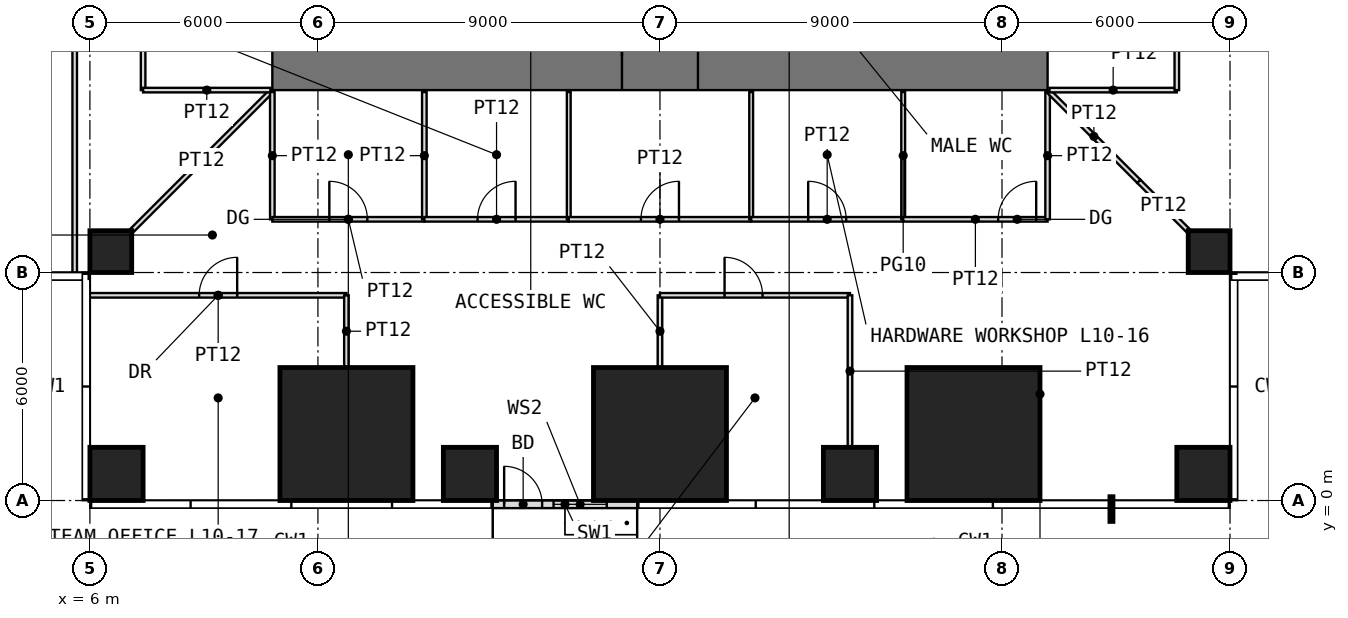
"""IFC4 building model, lengths in metres.
Left out: names, types, materials, properties, quantities, classifications, styles, units other than length and angle.
Written with IfcOpenShell. Run it as: python <this file> out.ifc"""

import sys

from ifc_helpers import new_model, si_unit, direction, frame, frame_2d, origin, origin_2d, place, context, subcontext, project, spatial, rectangle, extrude, element, fill, save


model = new_model("IFC4")
c1 = context("Model", 3, precision=1e-05, world=origin(), true_north=direction((0.0, 1.0)))
c2 = subcontext(c1, "Body", "Model", "MODEL_VIEW")
j1 = project(units=[si_unit("LENGTHUNIT", "METRE"), si_unit("PLANEANGLEUNIT", "RADIAN")], contexts=[c1])
p1 = place(None, origin())
s1 = spatial("IfcSite", under=j1, at=p1, CompositionType="ELEMENT")
p2 = place(p1, origin())
s2 = spatial("IfcBuilding", under=s1, at=p2, CompositionType="ELEMENT")
p3 = place(p2, frame((0.0, 0.0, 46.5)))
s3 = spatial("IfcBuildingStorey", under=s2, at=p3, CompositionType="ELEMENT", Elevation=46.5)
p4 = place(p3, frame((6.7, 0.7, 0.0), z_axis=(0.0, 0.0, 1.0), x_axis=(1.0, 0.0, 0.0)))
e1 = element("IfcColumn", 1, at=p4, inside=s3, PredefinedType="COLUMN", context=c2, shape_type="SweptSolid", body=[
    extrude(rectangle(XDim=1.4, YDim=1.4, at=origin_2d()), origin(), (0.0, 0.0, 1.0), 4.0),
])
p5 = place(p3, frame((12.75, 1.75, 0.0), z_axis=(0.0, 0.0, 1.0), x_axis=(1.0, 0.0, 0.0)))
e2 = element("IfcColumn", 2, at=p5, inside=s3, PredefinedType="COLUMN", context=c2, shape_type="SweptSolid", body=[
    extrude(rectangle(XDim=3.5, YDim=3.5, at=origin_2d()), origin(), (0.0, 0.0, 1.0), 4.0),
])
p6 = place(p3, frame((16.0, 0.7, 0.0), z_axis=(0.0, 0.0, 1.0), x_axis=(1.0, 0.0, 0.0)))
e3 = element("IfcColumn", 3, at=p6, inside=s3, PredefinedType="COLUMN", context=c2, shape_type="SweptSolid", body=[
    extrude(rectangle(XDim=1.4, YDim=1.4, at=origin_2d()), origin(), (0.0, 0.0, 1.0), 4.0),
])
p7 = place(p3, frame((21.0, 1.75, 0.0), z_axis=(0.0, 0.0, 1.0), x_axis=(1.0, 0.0, 0.0)))
e4 = element("IfcColumn", 4, at=p7, inside=s3, PredefinedType="COLUMN", context=c2, shape_type="SweptSolid", body=[
    extrude(rectangle(XDim=3.5, YDim=3.5, at=origin_2d()), origin(), (0.0, 0.0, 1.0), 4.0),
])
p8 = place(p3, frame((26.0, 0.7, 0.0), z_axis=(0.0, 0.0, 1.0), x_axis=(1.0, 0.0, 0.0)))
e5 = element("IfcColumn", 5, at=p8, inside=s3, PredefinedType="COLUMN", context=c2, shape_type="SweptSolid", body=[
    extrude(rectangle(XDim=1.4, YDim=1.4, at=origin_2d()), origin(), (0.0, 0.0, 1.0), 4.0),
])
p9 = place(p3, frame((29.25, 1.75, 0.0), z_axis=(0.0, 0.0, 1.0), x_axis=(1.0, 0.0, 0.0)))
e6 = element("IfcColumn", 6, at=p9, inside=s3, PredefinedType="COLUMN", context=c2, shape_type="SweptSolid", body=[
    extrude(rectangle(XDim=3.5, YDim=3.5, at=origin_2d()), origin(), (0.0, 0.0, 1.0), 4.0),
])
p10 = place(p3, frame((35.3, 0.7, 0.0), z_axis=(0.0, 0.0, 1.0), x_axis=(1.0, 0.0, 0.0)))
e7 = element("IfcColumn", 7, at=p10, inside=s3, PredefinedType="COLUMN", context=c2, shape_type="SweptSolid", body=[
    extrude(rectangle(XDim=1.4, YDim=1.4, at=origin_2d()), origin(), (0.0, 0.0, 1.0), 4.0),
])
for number, where, z_axis, x_axis in (
    (8, (6.55, 6.55, 0.0), (0.0, 0.0, 1.0), (1.0, 0.0, 0.0)),
    (9, (35.45, 6.55, 0.0), (0.0, 0.0, 1.0), (1.0, 0.0, 0.0)),
):
    element("IfcColumn", number, at=place(p3, frame(where, z_axis=z_axis, x_axis=x_axis)), inside=s3, PredefinedType="COLUMN", context=c2, shape_type="SweptSolid", body=[
        extrude(rectangle(XDim=1.1, YDim=1.1, at=origin_2d()), origin(), (0.0, 0.0, 1.0), 4.0),
    ])
p11 = place(p3, frame((16.6, -0.1, 0.0), z_axis=(0.0, 0.0, 1.0), x_axis=(1.0, 0.0, 0.0)))
e10 = element("IfcWall", 10, at=p11, inside=s3, PredefinedType="USERDEFINED", context=c2, shape_type="SweptSolid", body=[
    extrude(rectangle(XDim=3.8, YDim=0.2, at=frame_2d((1.9, 0.0))), origin(), (0.0, 0.0, 1.0), 3.75),
])
p12 = place(p11, frame((0.3, 0.0, 0.0)))
e11 = element("IfcOpeningElement", 11, at=p12, cuts=e10, PredefinedType="OPENING", context=c2, shape_type="SweptSolid", body=[
    extrude(rectangle(XDim=1.0, YDim=2.4, at=frame_2d((0.5, 1.2))), frame((0.0, 0.11, 0.0), z_axis=(0.0, -1.0, 0.0), x_axis=(1.0, 0.0, 0.0)), (0.0, 0.0, 1.0), 0.22),
])
p13 = place(p11, frame((1.6, 0.0, 0.3)))
e12 = element("IfcOpeningElement", 12, at=p13, cuts=e10, PredefinedType="OPENING", context=c2, shape_type="SweptSolid", body=[
    extrude(rectangle(XDim=1.4, YDim=2.7, at=frame_2d((0.7, 1.35))), frame((0.0, 0.11, 0.0), z_axis=(0.0, -1.0, 0.0), x_axis=(1.0, 0.0, 0.0)), (0.0, 0.0, 1.0), 0.22),
])
p14 = place(p3, frame((10.8, 11.7, -0.05), z_axis=(0.0, 0.0, 1.0), x_axis=(1.0, 0.0, 0.0)))
e13 = element("IfcWall", 13, at=p14, inside=s3, PredefinedType="SHEAR", context=c2, shape_type="SweptSolid", body=[
    extrude(rectangle(XDim=20.4, YDim=1.8, at=frame_2d((10.2, 0.0))), origin(), (0.0, 0.0, 1.0), 4.0),
])
p15 = place(p14, frame((9.2, 0.0, 0.05)))
e14 = element("IfcOpeningElement", 14, at=p15, cuts=e13, PredefinedType="OPENING", context=c2, shape_type="SweptSolid", body=[
    extrude(rectangle(XDim=2.0, YDim=2.2, at=frame_2d((1.0, 1.1))), frame((0.0, 0.91, 0.0), z_axis=(0.0, -1.0, 0.0), x_axis=(1.0, 0.0, 0.0)), (0.0, 0.0, 1.0), 1.82),
])
p16 = place(p3, frame((5.6, 6.0, 0.0), z_axis=(0.0, 0.0, 1.0), x_axis=(0.0, 1.0, 0.0)))
e15 = element("IfcWall", 15, at=p16, inside=s3, PredefinedType="PARTITIONING", context=c2, shape_type="SweptSolid", body=[
    extrude(rectangle(XDim=30.0, YDim=0.12, at=frame_2d((15.0, 0.0))), origin(), (0.0, 0.0, 1.0), 3.75),
])
p17 = place(p16, frame((14.5, 0.0, 0.0)))
e16 = element("IfcOpeningElement", 16, at=p17, cuts=e15, PredefinedType="OPENING", context=c2, shape_type="SweptSolid", body=[
    extrude(rectangle(XDim=1.0, YDim=2.4, at=frame_2d((0.5, 1.2))), frame((0.0, 0.07, 0.0), z_axis=(0.0, -1.0, 0.0), x_axis=(1.0, 0.0, 0.0)), (0.0, 0.0, 1.0), 0.14),
])
p18 = place(p3, frame((6.0, 5.4, 0.0), z_axis=(0.0, 0.0, 1.0), x_axis=(1.0, 0.0, 0.0)))
e17 = element("IfcWall", 17, at=p18, inside=s3, PredefinedType="PARTITIONING", context=c2, shape_type="SweptSolid", body=[
    extrude(rectangle(XDim=6.75, YDim=0.12, at=frame_2d((3.375, 0.0))), origin(), (0.0, 0.0, 1.0), 3.75),
])
p19 = place(p18, frame((2.875, 0.0, 0.0)))
e18 = element("IfcOpeningElement", 18, at=p19, cuts=e17, PredefinedType="OPENING", context=c2, shape_type="SweptSolid", body=[
    extrude(rectangle(XDim=1.0, YDim=2.2, at=frame_2d((0.5, 1.1))), frame((0.0, 0.07, 0.0), z_axis=(0.0, -1.0, 0.0), x_axis=(1.0, 0.0, 0.0)), (0.0, 0.0, 1.0), 0.14),
])
p20 = place(p3, frame((7.11, 7.11, 0.0), z_axis=(0.0, 0.0, 1.0), x_axis=(0.707106781187, 0.707106781187, 0.0)))
e19 = element("IfcWall", 19, at=p20, inside=s3, PredefinedType="PARTITIONING", context=c2, shape_type="SweptSolid", body=[
    extrude(rectangle(XDim=5.168, YDim=0.12, at=frame_2d((2.584, 0.0))), origin(), (0.0, 0.0, 1.0), 3.75),
])
p21 = place(p3, frame((7.4, 10.8, 0.0), z_axis=(0.0, 0.0, 1.0), x_axis=(0.0, 1.0, 0.0)))
e20 = element("IfcWall", 20, at=p21, inside=s3, PredefinedType="PARTITIONING", context=c2, shape_type="SweptSolid", body=[
    extrude(rectangle(XDim=4.8, YDim=0.12, at=frame_2d((2.4, 0.0))), origin(), (0.0, 0.0, 1.0), 3.75),
])
p22 = place(p21, frame((1.9, 0.0, 0.0)))
e21 = element("IfcOpeningElement", 21, at=p22, cuts=e20, PredefinedType="OPENING", context=c2, shape_type="SweptSolid", body=[
    extrude(rectangle(XDim=1.0, YDim=2.4, at=frame_2d((0.5, 1.2))), frame((0.0, 0.07, 0.0), z_axis=(0.0, -1.0, 0.0), x_axis=(1.0, 0.0, 0.0)), (0.0, 0.0, 1.0), 0.14),
])
for number, where, z_axis, x_axis in (
    (22, (7.4, 10.8, 0.0), (0.0, 0.0, 1.0), (1.0, 0.0, 0.0)),
    (23, (10.8, 7.4, 0.0), (0.0, 0.0, 1.0), (0.0, 1.0, 0.0)),
):
    element("IfcWall", number, at=place(p3, frame(where, z_axis=z_axis, x_axis=x_axis)), inside=s3, PredefinedType="PARTITIONING", context=c2, shape_type="SweptSolid", body=[
        extrude(rectangle(XDim=3.35, YDim=0.12, at=frame_2d((1.675, 0.0))), origin(), (0.0, 0.0, 1.0), 3.75),
    ])
p23 = place(p3, frame((10.8, 7.4, 0.0), z_axis=(0.0, 0.0, 1.0), x_axis=(1.0, 0.0, 0.0)))
e24 = element("IfcWall", 24, at=p23, inside=s3, PredefinedType="PARTITIONING", context=c2, shape_type="SweptSolid", body=[
    extrude(rectangle(XDim=4.0, YDim=0.12, at=frame_2d((2.0, 0.0))), origin(), (0.0, 0.0, 1.0), 3.75),
])
p24 = place(p23, frame((1.5, 0.0, 0.0)))
e25 = element("IfcOpeningElement", 25, at=p24, cuts=e24, PredefinedType="OPENING", context=c2, shape_type="SweptSolid", body=[
    extrude(rectangle(XDim=1.0, YDim=2.4, at=frame_2d((0.5, 1.2))), frame((0.0, 0.07, 0.0), z_axis=(0.0, -1.0, 0.0), x_axis=(1.0, 0.0, 0.0)), (0.0, 0.0, 1.0), 0.14),
])
p25 = place(p3, frame((12.75, 3.51, 0.0), z_axis=(0.0, 0.0, 1.0), x_axis=(0.0, 1.0, 0.0)))
e26 = element("IfcWall", 26, at=p25, inside=s3, PredefinedType="PARTITIONING", context=c2, shape_type="SweptSolid", body=[
    extrude(rectangle(XDim=1.89, YDim=0.12, at=frame_2d((0.945, 0.0))), origin(), (0.0, 0.0, 1.0), 3.75),
])
p26 = place(p3, frame((14.8, 7.4, 0.0), z_axis=(0.0, 0.0, 1.0), x_axis=(0.0, 1.0, 0.0)))
e27 = element("IfcWall", 27, at=p26, inside=s3, PredefinedType="PARTITIONING", context=c2, shape_type="SweptSolid", body=[
    extrude(rectangle(XDim=3.35, YDim=0.12, at=frame_2d((1.675, 0.0))), origin(), (0.0, 0.0, 1.0), 3.75),
])
p27 = place(p3, frame((14.8, 7.4, 0.0), z_axis=(0.0, 0.0, 1.0), x_axis=(1.0, 0.0, 0.0)))
e28 = element("IfcWall", 28, at=p27, inside=s3, PredefinedType="PARTITIONING", context=c2, shape_type="SweptSolid", body=[
    extrude(rectangle(XDim=3.8, YDim=0.12, at=frame_2d((1.9, 0.0))), origin(), (0.0, 0.0, 1.0), 3.75),
])
p28 = place(p27, frame((1.4, 0.0, 0.0)))
e29 = element("IfcOpeningElement", 29, at=p28, cuts=e28, PredefinedType="OPENING", context=c2, shape_type="SweptSolid", body=[
    extrude(rectangle(XDim=1.0, YDim=2.4, at=frame_2d((0.5, 1.2))), frame((0.0, 0.07, 0.0), z_axis=(0.0, -1.0, 0.0), x_axis=(1.0, 0.0, 0.0)), (0.0, 0.0, 1.0), 0.14),
])
p29 = place(p3, frame((18.6, 7.4, 0.0), z_axis=(0.0, 0.0, 1.0), x_axis=(0.0, 1.0, 0.0)))
e30 = element("IfcWall", 30, at=p29, inside=s3, PredefinedType="PARTITIONING", context=c2, shape_type="SweptSolid", body=[
    extrude(rectangle(XDim=3.35, YDim=0.1, at=frame_2d((1.675, 0.0))), origin(), (0.0, 0.0, 1.0), 3.75),
])
p30 = place(p3, frame((18.6, 7.4, 0.0), z_axis=(0.0, 0.0, 1.0), x_axis=(1.0, 0.0, 0.0)))
e31 = element("IfcWall", 31, at=p30, inside=s3, PredefinedType="PARTITIONING", context=c2, shape_type="SweptSolid", body=[
    extrude(rectangle(XDim=4.8, YDim=0.12, at=frame_2d((2.4, 0.0))), origin(), (0.0, 0.0, 1.0), 3.75),
])
p31 = place(p30, frame((1.9, 0.0, 0.0)))
e32 = element("IfcOpeningElement", 32, at=p31, cuts=e31, PredefinedType="OPENING", context=c2, shape_type="SweptSolid", body=[
    extrude(rectangle(XDim=1.0, YDim=2.4, at=frame_2d((0.5, 1.2))), frame((0.0, 0.07, 0.0), z_axis=(0.0, -1.0, 0.0), x_axis=(1.0, 0.0, 0.0)), (0.0, 0.0, 1.0), 0.14),
])
p32 = place(p3, frame((21.0, 3.51, 0.0), z_axis=(0.0, 0.0, 1.0), x_axis=(0.0, 1.0, 0.0)))
e33 = element("IfcWall", 33, at=p32, inside=s3, PredefinedType="PARTITIONING", context=c2, shape_type="SweptSolid", body=[
    extrude(rectangle(XDim=1.89, YDim=0.12, at=frame_2d((0.945, 0.0))), origin(), (0.0, 0.0, 1.0), 3.75),
])
p33 = place(p3, frame((21.0, 5.4, 0.0), z_axis=(0.0, 0.0, 1.0), x_axis=(1.0, 0.0, 0.0)))
e34 = element("IfcWall", 34, at=p33, inside=s3, PredefinedType="PARTITIONING", context=c2, shape_type="SweptSolid", body=[
    extrude(rectangle(XDim=5.0, YDim=0.12, at=frame_2d((2.5, 0.0))), origin(), (0.0, 0.0, 1.0), 3.75),
])
p34 = place(p33, frame((1.7, 0.0, 0.0)))
e35 = element("IfcOpeningElement", 35, at=p34, cuts=e34, PredefinedType="OPENING", context=c2, shape_type="SweptSolid", body=[
    extrude(rectangle(XDim=1.0, YDim=2.2, at=frame_2d((0.5, 1.1))), frame((0.0, 0.07, 0.0), z_axis=(0.0, -1.0, 0.0), x_axis=(1.0, 0.0, 0.0)), (0.0, 0.0, 1.0), 0.14),
])
p35 = place(p3, frame((23.4, 7.4, 0.0), z_axis=(0.0, 0.0, 1.0), x_axis=(0.0, 1.0, 0.0)))
e36 = element("IfcWall", 36, at=p35, inside=s3, PredefinedType="PARTITIONING", context=c2, shape_type="SweptSolid", body=[
    extrude(rectangle(XDim=3.35, YDim=0.1, at=frame_2d((1.675, 0.0))), origin(), (0.0, 0.0, 1.0), 3.75),
])
p36 = place(p3, frame((23.4, 7.4, 0.0), z_axis=(0.0, 0.0, 1.0), x_axis=(1.0, 0.0, 0.0)))
e37 = element("IfcWall", 37, at=p36, inside=s3, PredefinedType="PARTITIONING", context=c2, shape_type="SweptSolid", body=[
    extrude(rectangle(XDim=4.0, YDim=0.12, at=frame_2d((2.0, 0.0))), origin(), (0.0, 0.0, 1.0), 3.75),
])
p37 = place(p36, frame((1.5, 0.0, 0.0)))
e38 = element("IfcOpeningElement", 38, at=p37, cuts=e37, PredefinedType="OPENING", context=c2, shape_type="SweptSolid", body=[
    extrude(rectangle(XDim=1.0, YDim=2.4, at=frame_2d((0.5, 1.2))), frame((0.0, 0.07, 0.0), z_axis=(0.0, -1.0, 0.0), x_axis=(1.0, 0.0, 0.0)), (0.0, 0.0, 1.0), 0.14),
])
p38 = place(p3, frame((26.0, 1.41, 0.0), z_axis=(0.0, 0.0, 1.0), x_axis=(0.0, 1.0, 0.0)))
e39 = element("IfcWall", 39, at=p38, inside=s3, PredefinedType="PARTITIONING", context=c2, shape_type="SweptSolid", body=[
    extrude(rectangle(XDim=3.99, YDim=0.12, at=frame_2d((1.995, 0.0))), origin(), (0.0, 0.0, 1.0), 3.75),
])
p39 = place(p3, frame((27.4, 7.4, 0.0), z_axis=(0.0, 0.0, 1.0), x_axis=(0.0, 1.0, 0.0)))
e40 = element("IfcWall", 40, at=p39, inside=s3, PredefinedType="PARTITIONING", context=c2, shape_type="SweptSolid", body=[
    extrude(rectangle(XDim=3.35, YDim=0.1, at=frame_2d((1.675, 0.0))), origin(), (0.0, 0.0, 1.0), 3.75),
])
p40 = place(p3, frame((27.4, 7.4, 0.0), z_axis=(0.0, 0.0, 1.0), x_axis=(1.0, 0.0, 0.0)))
e41 = element("IfcWall", 41, at=p40, inside=s3, PredefinedType="PARTITIONING", context=c2, shape_type="SweptSolid", body=[
    extrude(rectangle(XDim=3.8, YDim=0.12, at=frame_2d((1.9, 0.0))), origin(), (0.0, 0.0, 1.0), 3.75),
])
p41 = place(p40, frame((2.5, 0.0, 0.0)))
e42 = element("IfcOpeningElement", 42, at=p41, cuts=e41, PredefinedType="OPENING", context=c2, shape_type="SweptSolid", body=[
    extrude(rectangle(XDim=1.0, YDim=2.4, at=frame_2d((0.5, 1.2))), frame((0.0, 0.07, 0.0), z_axis=(0.0, -1.0, 0.0), x_axis=(1.0, 0.0, 0.0)), (0.0, 0.0, 1.0), 0.14),
])
p42 = place(p3, frame((31.2, 7.4, 0.0), z_axis=(0.0, 0.0, 1.0), x_axis=(0.0, 1.0, 0.0)))
e43 = element("IfcWall", 43, at=p42, inside=s3, PredefinedType="PARTITIONING", context=c2, shape_type="SweptSolid", body=[
    extrude(rectangle(XDim=3.35, YDim=0.12, at=frame_2d((1.675, 0.0))), origin(), (0.0, 0.0, 1.0), 3.75),
])
p43 = place(p3, frame((31.235, 10.765, 0.0), z_axis=(0.0, 0.0, 1.0), x_axis=(0.707106781187, -0.707106781187, 0.0)))
e44 = element("IfcWall", 44, at=p43, inside=s3, PredefinedType="PARTITIONING", context=c2, shape_type="SweptSolid", body=[
    extrude(rectangle(XDim=3.346, YDim=0.12, at=frame_2d((1.673, 0.0))), origin(), (0.0, 0.0, 1.0), 3.75),
])
p44 = place(p3, frame((31.25, 10.8, 0.0), z_axis=(0.0, 0.0, 1.0), x_axis=(1.0, 0.0, 0.0)))
e45 = element("IfcWall", 45, at=p44, inside=s3, PredefinedType="PARTITIONING", context=c2, shape_type="SweptSolid", body=[
    extrude(rectangle(XDim=3.35, YDim=0.12, at=frame_2d((1.675, 0.0))), origin(), (0.0, 0.0, 1.0), 3.75),
])
p45 = place(p3, frame((33.602, 8.398, 0.0), z_axis=(0.0, 0.0, 1.0), x_axis=(0.707106781187, -0.707106781187, 0.0)))
e46 = element("IfcWall", 46, at=p45, inside=s3, PredefinedType="PARTITIONING", context=c2, shape_type="SweptSolid", body=[
    extrude(rectangle(XDim=1.822, YDim=0.12, at=frame_2d((0.911, 0.0))), origin(), (0.0, 0.0, 1.0), 3.75),
])
p46 = place(p3, frame((34.6, 10.8, 0.0), z_axis=(0.0, 0.0, 1.0), x_axis=(0.0, 1.0, 0.0)))
e47 = element("IfcWall", 47, at=p46, inside=s3, PredefinedType="PARTITIONING", context=c2, shape_type="SweptSolid", body=[
    extrude(rectangle(XDim=6.6, YDim=0.12, at=frame_2d((3.3, 0.0))), origin(), (0.0, 0.0, 1.0), 3.75),
])
p47 = place(p46, frame((2.8, 0.0, 0.0)))
e48 = element("IfcOpeningElement", 48, at=p47, cuts=e47, PredefinedType="OPENING", context=c2, shape_type="SweptSolid", body=[
    extrude(rectangle(XDim=1.0, YDim=2.4, at=frame_2d((0.5, 1.2))), frame((0.0, 0.07, 0.0), z_axis=(0.0, -1.0, 0.0), x_axis=(1.0, 0.0, 0.0)), (0.0, 0.0, 1.0), 0.14),
])
p48 = place(p12, origin())
e49 = element("IfcDoor", 49, at=p48, inside=s3, OperationType="SINGLE_SWING_LEFT", PredefinedType="DOOR", context=c2, shape_type="SweptSolid", body=[
    extrude(rectangle(XDim=1.0, YDim=2.4, at=frame_2d((0.5, 1.2))), frame((0.0, 0.025, 0.0), z_axis=(0.0, -1.0, 0.0), x_axis=(1.0, 0.0, 0.0)), (0.0, 0.0, 1.0), 0.05),
])
fill(e11, e49)
p49 = place(p13, origin())
e50 = element("IfcWindow", 50, at=p49, inside=s3, PartitioningType="SINGLE_PANEL", PredefinedType="WINDOW", context=c2, shape_type="SweptSolid", body=[
    extrude(rectangle(XDim=1.4, YDim=2.7, at=frame_2d((0.7, 1.35))), frame((0.0, 0.03, 0.0), z_axis=(0.0, -1.0, 0.0), x_axis=(1.0, 0.0, 0.0)), (0.0, 0.0, 1.0), 0.06),
])
fill(e12, e50)
p50 = place(p15, origin())
e51 = element("IfcDoor", 51, at=p50, inside=s3, OperationType="DOUBLE_DOOR_SINGLE_SWING", PredefinedType="DOOR", context=c2, shape_type="SweptSolid", body=[
    extrude(rectangle(XDim=2.0, YDim=2.2, at=frame_2d((1.0, 1.1))), frame((0.0, 0.025, 0.0), z_axis=(0.0, -1.0, 0.0), x_axis=(1.0, 0.0, 0.0)), (0.0, 0.0, 1.0), 0.05),
])
fill(e14, e51)
p51 = place(p24, origin())
e52 = element("IfcDoor", 52, at=p51, inside=s3, OperationType="SINGLE_SWING_LEFT", PredefinedType="DOOR", context=c2, shape_type="SweptSolid", body=[
    extrude(rectangle(XDim=1.0, YDim=2.4, at=frame_2d((0.5, 1.2))), frame((0.0, 0.025, 0.0), z_axis=(0.0, -1.0, 0.0), x_axis=(1.0, 0.0, 0.0)), (0.0, 0.0, 1.0), 0.05),
])
fill(e25, e52)
p52 = place(p28, origin())
e53 = element("IfcDoor", 53, at=p52, inside=s3, OperationType="SINGLE_SWING_RIGHT", PredefinedType="DOOR", context=c2, shape_type="SweptSolid", body=[
    extrude(rectangle(XDim=1.0, YDim=2.4, at=frame_2d((0.5, 1.2))), frame((0.0, 0.025, 0.0), z_axis=(0.0, -1.0, 0.0), x_axis=(1.0, 0.0, 0.0)), (0.0, 0.0, 1.0), 0.05),
])
fill(e29, e53)
p53 = place(p37, origin())
e54 = element("IfcDoor", 54, at=p53, inside=s3, OperationType="SINGLE_SWING_LEFT", PredefinedType="DOOR", context=c2, shape_type="SweptSolid", body=[
    extrude(rectangle(XDim=1.0, YDim=2.4, at=frame_2d((0.5, 1.2))), frame((0.0, 0.025, 0.0), z_axis=(0.0, -1.0, 0.0), x_axis=(1.0, 0.0, 0.0)), (0.0, 0.0, 1.0), 0.05),
])
fill(e38, e54)
p54 = place(p19, origin())
e55 = element("IfcDoor", 55, at=p54, inside=s3, OperationType="SINGLE_SWING_RIGHT", PredefinedType="DOOR", context=c2, shape_type="SweptSolid", body=[
    extrude(rectangle(XDim=1.0, YDim=2.2, at=frame_2d((0.5, 1.1))), frame((0.0, 0.025, 0.0), z_axis=(0.0, -1.0, 0.0), x_axis=(1.0, 0.0, 0.0)), (0.0, 0.0, 1.0), 0.05),
])
fill(e18, e55)
p55 = place(p34, origin())
e56 = element("IfcDoor", 56, at=p55, inside=s3, OperationType="SINGLE_SWING_LEFT", PredefinedType="DOOR", context=c2, shape_type="SweptSolid", body=[
    extrude(rectangle(XDim=1.0, YDim=2.2, at=frame_2d((0.5, 1.1))), frame((0.0, 0.025, 0.0), z_axis=(0.0, -1.0, 0.0), x_axis=(1.0, 0.0, 0.0)), (0.0, 0.0, 1.0), 0.05),
])
fill(e35, e56)
p56 = place(p31, origin())
e57 = element("IfcDoor", 57, at=p56, inside=s3, OperationType="SINGLE_SWING_RIGHT", PredefinedType="DOOR", context=c2, shape_type="SweptSolid", body=[
    extrude(rectangle(XDim=1.0, YDim=2.4, at=frame_2d((0.5, 1.2))), frame((0.0, 0.025, 0.0), z_axis=(0.0, -1.0, 0.0), x_axis=(1.0, 0.0, 0.0)), (0.0, 0.0, 1.0), 0.05),
])
fill(e32, e57)
p57 = place(p41, origin())
e58 = element("IfcDoor", 58, at=p57, inside=s3, OperationType="SINGLE_SWING_RIGHT", PredefinedType="DOOR", context=c2, shape_type="SweptSolid", body=[
    extrude(rectangle(XDim=1.0, YDim=2.4, at=frame_2d((0.5, 1.2))), frame((0.0, 0.025, 0.0), z_axis=(0.0, -1.0, 0.0), x_axis=(1.0, 0.0, 0.0)), (0.0, 0.0, 1.0), 0.05),
])
fill(e42, e58)
save(model, sys.argv[1])
